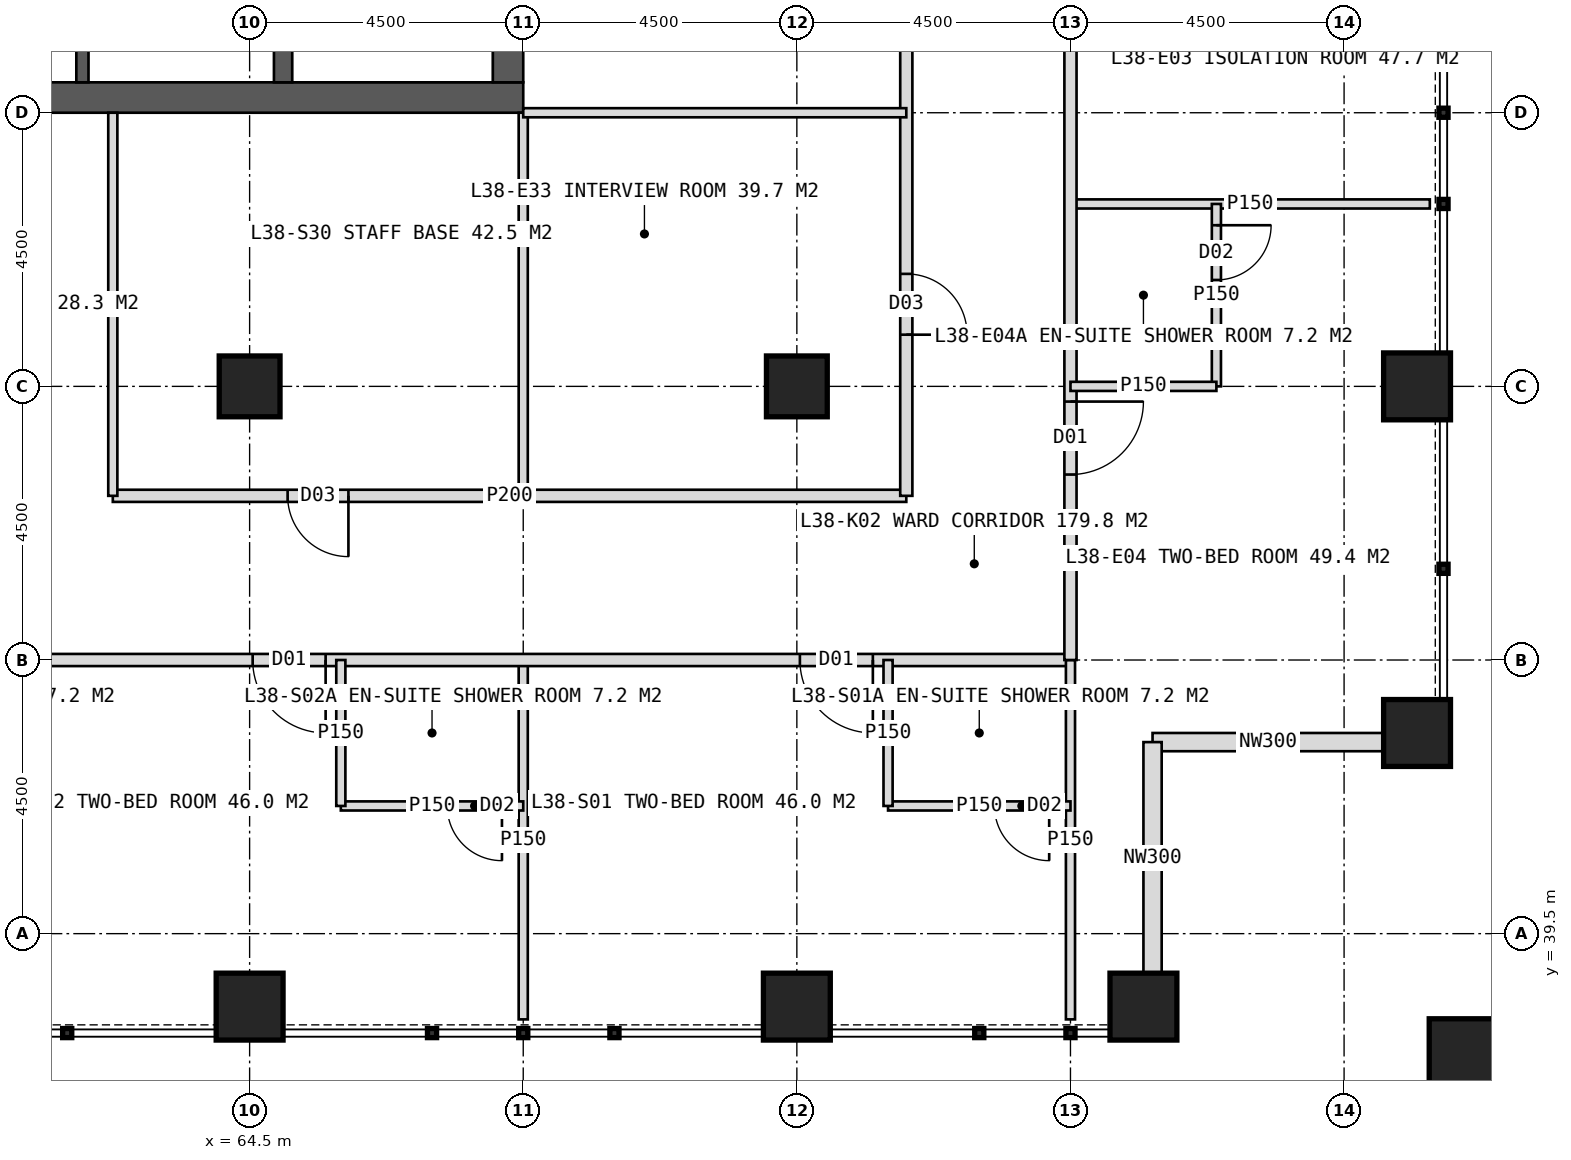
"""IFC4 building model, lengths in metres.
Left out: names, types, materials, properties, quantities, classifications, styles, units other than length and angle.
Written with IfcOpenShell. Run it as: python <this file> out.ifc"""

import sys

from ifc_helpers import new_model, si_unit, direction, frame, frame_2d, origin, origin_2d, place, context, subcontext, project, spatial, rectangle, hollow_rectangle, extrude, element, fill, save


model = new_model("IFC4")
c1 = context("Model", 3, precision=1e-05, world=origin(), true_north=direction((0.0, 1.0)))
c2 = subcontext(c1, "Body", "Model", "MODEL_VIEW")
j1 = project(units=[si_unit("LENGTHUNIT", "METRE"), si_unit("PLANEANGLEUNIT", "RADIAN")], contexts=[c1])
p1 = place(None, origin())
s1 = spatial("IfcSite", under=j1, at=p1, CompositionType="ELEMENT")
p2 = place(p1, origin())
s2 = spatial("IfcBuilding", under=s1, at=p2, CompositionType="ELEMENT")
p3 = place(p2, frame((0.0, 0.0, 160.0)))
s3 = spatial("IfcBuildingStorey", under=s2, at=p3, CompositionType="ELEMENT", Elevation=160.0)
p4 = place(p3, frame((51.0, 53.25, 0.0), z_axis=(0.0, 0.0, 1.0), x_axis=(1.0, 0.0, 0.0)))
e1 = element("IfcWall", 1, at=p4, inside=s3, PredefinedType="SHEAR", context=c2, shape_type="SweptSolid", body=[
    extrude(rectangle(XDim=18.0, YDim=0.5, at=frame_2d((9.0, 0.0))), origin(), (0.0, 0.0, 1.0), 4.0),
])
p5 = place(p4, frame((8.1, 0.0, 0.0)))
e2 = element("IfcOpeningElement", 2, at=p5, cuts=e1, PredefinedType="OPENING", context=c2, shape_type="SweptSolid", body=[
    extrude(rectangle(XDim=1.8, YDim=2.2, at=frame_2d((0.9, 1.1))), frame((0.0, 0.26, 0.0), z_axis=(0.0, -1.0, 0.0), x_axis=(1.0, 0.0, 0.0)), (0.0, 0.0, 1.0), 0.52),
])
p6 = place(p3, frame((68.75, 53.5, 0.0), z_axis=(0.0, 0.0, 1.0), x_axis=(0.0, 1.0, 0.0)))
e3 = element("IfcWall", 3, at=p6, inside=s3, PredefinedType="SHEAR", context=c2, shape_type="SweptSolid", body=[
    extrude(rectangle(XDim=17.0, YDim=0.5, at=frame_2d((8.5, 0.0))), origin(), (0.0, 0.0, 1.0), 4.0),
])
p7 = place(p6, frame((9.5, 0.0, 0.0)))
e4 = element("IfcOpeningElement", 4, at=p7, cuts=e3, PredefinedType="OPENING", context=c2, shape_type="SweptSolid", body=[
    extrude(rectangle(XDim=1.5, YDim=2.2, at=frame_2d((0.75, 1.1))), frame((0.0, 0.26, 0.0), z_axis=(0.0, -1.0, 0.0), x_axis=(1.0, 0.0, 0.0)), (0.0, 0.0, 1.0), 0.52),
])
p8 = place(p3, frame((65.05, 53.5, 0.0), z_axis=(0.0, 0.0, 1.0), x_axis=(0.0, 1.0, 0.0)))
e5 = element("IfcWall", 5, at=p8, inside=s3, PredefinedType="SHEAR", context=c2, shape_type="SweptSolid", body=[
    extrude(rectangle(XDim=17.0, YDim=0.3, at=frame_2d((8.5, 0.0))), origin(), (0.0, 0.0, 1.0), 4.0),
])
p9 = place(p3, frame((61.75, 53.5, 0.0), z_axis=(0.0, 0.0, 1.0), x_axis=(0.0, 1.0, 0.0)))
e6 = element("IfcWall", 6, at=p9, inside=s3, PredefinedType="SHEAR", context=c2, shape_type="SweptSolid", body=[
    extrude(rectangle(XDim=17.0, YDim=0.2, at=frame_2d((8.5, 0.0))), origin(), (0.0, 0.0, 1.0), 4.0),
])
p10 = place(p9, frame((1.375, 0.0, 0.0)))
e7 = element("IfcOpeningElement", 7, at=p10, cuts=e6, PredefinedType="OPENING", context=c2, shape_type="SweptSolid", body=[
    extrude(rectangle(XDim=1.4, YDim=2.2, at=frame_2d((0.7, 1.1))), frame((0.0, 0.11, 0.0), z_axis=(0.0, -1.0, 0.0), x_axis=(1.0, 0.0, 0.0)), (0.0, 0.0, 1.0), 0.22),
])
p11 = place(p9, frame((5.675, 0.0, 0.0)))
e8 = element("IfcOpeningElement", 8, at=p11, cuts=e6, PredefinedType="OPENING", context=c2, shape_type="SweptSolid", body=[
    extrude(rectangle(XDim=1.4, YDim=2.2, at=frame_2d((0.7, 1.1))), frame((0.0, 0.11, 0.0), z_axis=(0.0, -1.0, 0.0), x_axis=(1.0, 0.0, 0.0)), (0.0, 0.0, 1.0), 0.22),
])
for number, where, z_axis, x_axis in (
    (9, (73.5, 48.5, 0.0), (0.0, 0.0, 1.0), (1.0, 0.0, 0.0)),
    (10, (64.5, 48.5, 0.0), (0.0, 0.0, 1.0), (1.0, 0.0, 0.0)),
):
    element("IfcColumn", number, at=place(p3, frame(where, z_axis=z_axis, x_axis=x_axis)), inside=s3, PredefinedType="COLUMN", context=c2, shape_type="SweptSolid", body=[
        extrude(hollow_rectangle(XDim=1.0, YDim=1.0, WallThickness=0.1, at=origin_2d()), origin(), (0.0, 0.0, 1.0), 4.0),
    ])
for number, where, z_axis, x_axis in (
    (11, (83.7, 42.8, 0.0), (0.0, 0.0, 1.0), (1.0, 0.0, 0.0)),
    (12, (83.7, 48.5, 0.0), (0.0, 0.0, 1.0), (1.0, 0.0, 0.0)),
    (13, (64.5, 38.3, 0.0), (0.0, 0.0, 1.0), (1.0, 0.0, 0.0)),
    (14, (73.5, 38.3, 0.0), (0.0, 0.0, 1.0), (1.0, 0.0, 0.0)),
    (15, (79.2, 38.3, 0.0), (0.0, 0.0, 1.0), (1.0, 0.0, 0.0)),
):
    element("IfcColumn", number, at=place(p3, frame(where, z_axis=z_axis, x_axis=x_axis)), inside=s3, PredefinedType="COLUMN", context=c2, shape_type="SweptSolid", body=[
        extrude(hollow_rectangle(XDim=1.1, YDim=1.1, WallThickness=0.1, at=origin_2d()), origin(), (0.0, 0.0, 1.0), 4.0),
    ])
p12 = place(p3, frame((84.6, 37.4, 0.0), z_axis=(0.0, 0.0, 1.0), x_axis=(1.0, 0.0, 0.0)))
e16 = element("IfcColumn", 16, at=p12, inside=s3, PredefinedType="COLUMN", context=c2, shape_type="SweptSolid", body=[
    extrude(hollow_rectangle(XDim=1.4, YDim=1.4, WallThickness=0.08, at=origin_2d()), origin(), (0.0, 0.0, 1.0), 4.0),
])
for number, where, z_axis, x_axis in (
    (17, (83.15, 42.65, 0.0), (0.0, 0.0, 1.0), (-1.0, 0.0, 0.0)),
    (18, (79.35, 42.65, 0.0), (0.0, 0.0, 1.0), (0.0, -1.0, 0.0)),
):
    element("IfcWall", number, at=place(p3, frame(where, z_axis=z_axis, x_axis=x_axis)), inside=s3, PredefinedType="ELEMENTEDWALL", context=c2, shape_type="SweptSolid", body=[
        extrude(rectangle(XDim=3.8, YDim=0.3, at=frame_2d((1.9, 0.0))), origin(), (0.0, 0.0, 1.0), 4.0),
    ])
p13 = place(p3, frame((69.0, 44.0, 0.0), z_axis=(0.0, 0.0, 1.0), x_axis=(0.0, -1.0, 0.0)))
e19 = element("IfcWall", 19, at=p13, inside=s3, PredefinedType="PARTITIONING", context=c2, shape_type="SweptSolid", body=[
    extrude(rectangle(XDim=5.91, YDim=0.15, at=frame_2d((2.955, 0.0))), origin(), (0.0, 0.0, 1.0), 3.75),
])
p14 = place(p3, frame((78.0, 44.0, 0.0), z_axis=(0.0, 0.0, 1.0), x_axis=(-1.0, 0.0, 0.0)))
e20 = element("IfcWall", 20, at=p14, inside=s3, PredefinedType="PARTITIONING", context=c2, shape_type="SweptSolid", body=[
    extrude(rectangle(XDim=36.0, YDim=0.2, at=frame_2d((18.0, 0.0))), origin(), (0.0, 0.0, 1.0), 3.75),
])
p15 = place(p14, frame((3.25, 0.0, 0.0)))
e21 = element("IfcOpeningElement", 21, at=p15, cuts=e20, PredefinedType="OPENING", context=c2, shape_type="SweptSolid", body=[
    extrude(rectangle(XDim=1.2, YDim=2.2, at=frame_2d((0.6, 1.1))), frame((0.0, 0.11, 0.0), z_axis=(0.0, -1.0, 0.0), x_axis=(1.0, 0.0, 0.0)), (0.0, 0.0, 1.0), 0.22),
])
p16 = place(p14, frame((12.25, 0.0, 0.0)))
e22 = element("IfcOpeningElement", 22, at=p16, cuts=e20, PredefinedType="OPENING", context=c2, shape_type="SweptSolid", body=[
    extrude(rectangle(XDim=1.2, YDim=2.2, at=frame_2d((0.6, 1.1))), frame((0.0, 0.11, 0.0), z_axis=(0.0, -1.0, 0.0), x_axis=(1.0, 0.0, 0.0)), (0.0, 0.0, 1.0), 0.22),
])
p17 = place(p14, frame((21.25, 0.0, 0.0)))
e23 = element("IfcOpeningElement", 23, at=p17, cuts=e20, PredefinedType="OPENING", context=c2, shape_type="SweptSolid", body=[
    extrude(rectangle(XDim=1.2, YDim=2.2, at=frame_2d((0.6, 1.1))), frame((0.0, 0.11, 0.0), z_axis=(0.0, -1.0, 0.0), x_axis=(1.0, 0.0, 0.0)), (0.0, 0.0, 1.0), 0.22),
])
p18 = place(p14, frame((29.65, 0.0, 0.0)))
e24 = element("IfcOpeningElement", 24, at=p18, cuts=e20, PredefinedType="OPENING", context=c2, shape_type="SweptSolid", body=[
    extrude(rectangle(XDim=1.2, YDim=2.2, at=frame_2d((0.6, 1.1))), frame((0.0, 0.11, 0.0), z_axis=(0.0, -1.0, 0.0), x_axis=(1.0, 0.0, 0.0)), (0.0, 0.0, 1.0), 0.22),
])
p19 = place(p3, frame((78.0, 44.0, 0.0), z_axis=(0.0, 0.0, 1.0), x_axis=(0.0, -1.0, 0.0)))
e25 = element("IfcWall", 25, at=p19, inside=s3, PredefinedType="PARTITIONING", context=c2, shape_type="SweptSolid", body=[
    extrude(rectangle(XDim=5.91, YDim=0.15, at=frame_2d((2.955, 0.0))), origin(), (0.0, 0.0, 1.0), 3.75),
])
p20 = place(p3, frame((78.0, 41.6, 0.0), z_axis=(0.0, 0.0, 1.0), x_axis=(-1.0, 0.0, 0.0)))
e26 = element("IfcWall", 26, at=p20, inside=s3, PredefinedType="PARTITIONING", context=c2, shape_type="SweptSolid", body=[
    extrude(rectangle(XDim=3.0, YDim=0.15, at=frame_2d((1.5, 0.0))), origin(), (0.0, 0.0, 1.0), 3.75),
])
p21 = place(p20, frame((0.35, 0.0, 0.0)))
e27 = element("IfcOpeningElement", 27, at=p21, cuts=e26, PredefinedType="OPENING", context=c2, shape_type="SweptSolid", body=[
    extrude(rectangle(XDim=0.9, YDim=2.1, at=frame_2d((0.45, 1.05))), frame((0.0, 0.085, 0.0), z_axis=(0.0, -1.0, 0.0), x_axis=(1.0, 0.0, 0.0)), (0.0, 0.0, 1.0), 0.17),
])
p22 = place(p3, frame((75.0, 44.0, 0.0), z_axis=(0.0, 0.0, 1.0), x_axis=(0.0, -1.0, 0.0)))
e28 = element("IfcWall", 28, at=p22, inside=s3, PredefinedType="PARTITIONING", context=c2, shape_type="SweptSolid", body=[
    extrude(rectangle(XDim=2.4, YDim=0.15, at=frame_2d((1.2, 0.0))), origin(), (0.0, 0.0, 1.0), 3.75),
])
p23 = place(p3, frame((69.0, 41.6, 0.0), z_axis=(0.0, 0.0, 1.0), x_axis=(-1.0, 0.0, 0.0)))
e29 = element("IfcWall", 29, at=p23, inside=s3, PredefinedType="PARTITIONING", context=c2, shape_type="SweptSolid", body=[
    extrude(rectangle(XDim=3.0, YDim=0.15, at=frame_2d((1.5, 0.0))), origin(), (0.0, 0.0, 1.0), 3.75),
])
p24 = place(p23, frame((0.35, 0.0, 0.0)))
e30 = element("IfcOpeningElement", 30, at=p24, cuts=e29, PredefinedType="OPENING", context=c2, shape_type="SweptSolid", body=[
    extrude(rectangle(XDim=0.9, YDim=2.1, at=frame_2d((0.45, 1.05))), frame((0.0, 0.085, 0.0), z_axis=(0.0, -1.0, 0.0), x_axis=(1.0, 0.0, 0.0)), (0.0, 0.0, 1.0), 0.17),
])
p25 = place(p3, frame((66.0, 44.0, 0.0), z_axis=(0.0, 0.0, 1.0), x_axis=(0.0, -1.0, 0.0)))
e31 = element("IfcWall", 31, at=p25, inside=s3, PredefinedType="PARTITIONING", context=c2, shape_type="SweptSolid", body=[
    extrude(rectangle(XDim=2.4, YDim=0.15, at=frame_2d((1.2, 0.0))), origin(), (0.0, 0.0, 1.0), 3.75),
])
p26 = place(p3, frame((69.0, 53.0, 0.0), z_axis=(0.0, 0.0, 1.0), x_axis=(0.0, -1.0, 0.0)))
e32 = element("IfcWall", 32, at=p26, inside=s3, PredefinedType="PARTITIONING", context=c2, shape_type="SweptSolid", body=[
    extrude(rectangle(XDim=6.3, YDim=0.15, at=frame_2d((3.15, 0.0))), origin(), (0.0, 0.0, 1.0), 3.75),
])
p27 = place(p3, frame((75.3, 46.7, 0.0), z_axis=(0.0, 0.0, 1.0), x_axis=(-1.0, 0.0, 0.0)))
e33 = element("IfcWall", 33, at=p27, inside=s3, PredefinedType="PARTITIONING", context=c2, shape_type="SweptSolid", body=[
    extrude(rectangle(XDim=13.05, YDim=0.2, at=frame_2d((6.525, 0.0))), origin(), (0.0, 0.0, 1.0), 3.75),
])
p28 = place(p27, frame((9.175, 0.0, 0.0)))
e34 = element("IfcOpeningElement", 34, at=p28, cuts=e33, PredefinedType="OPENING", context=c2, shape_type="SweptSolid", body=[
    extrude(rectangle(XDim=1.0, YDim=2.1, at=frame_2d((0.5, 1.05))), frame((0.0, 0.11, 0.0), z_axis=(0.0, -1.0, 0.0), x_axis=(1.0, 0.0, 0.0)), (0.0, 0.0, 1.0), 0.22),
])
p29 = place(p3, frame((62.25, 53.0, 0.0), z_axis=(0.0, 0.0, 1.0), x_axis=(0.0, -1.0, 0.0)))
e35 = element("IfcWall", 35, at=p29, inside=s3, PredefinedType="PARTITIONING", context=c2, shape_type="SweptSolid", body=[
    extrude(rectangle(XDim=6.3, YDim=0.15, at=frame_2d((3.15, 0.0))), origin(), (0.0, 0.0, 1.0), 3.75),
])
p30 = place(p3, frame((78.0, 51.5, 0.0), z_axis=(0.0, 0.0, 1.0), x_axis=(1.0, 0.0, 0.0)))
e36 = element("IfcWall", 36, at=p30, inside=s3, PredefinedType="PARTITIONING", context=c2, shape_type="SweptSolid", body=[
    extrude(rectangle(XDim=5.91, YDim=0.15, at=frame_2d((2.955, 0.0))), origin(), (0.0, 0.0, 1.0), 3.75),
])
p31 = place(p3, frame((78.0, 80.0, 0.0), z_axis=(0.0, 0.0, 1.0), x_axis=(0.0, -1.0, 0.0)))
e37 = element("IfcWall", 37, at=p31, inside=s3, PredefinedType="PARTITIONING", context=c2, shape_type="SweptSolid", body=[
    extrude(rectangle(XDim=36.0, YDim=0.2, at=frame_2d((18.0, 0.0))), origin(), (0.0, 0.0, 1.0), 3.75),
])
p32 = place(p31, frame((3.25, 0.0, 0.0)))
e38 = element("IfcOpeningElement", 38, at=p32, cuts=e37, PredefinedType="OPENING", context=c2, shape_type="SweptSolid", body=[
    extrude(rectangle(XDim=1.2, YDim=2.2, at=frame_2d((0.6, 1.1))), frame((0.0, 0.11, 0.0), z_axis=(0.0, -1.0, 0.0), x_axis=(1.0, 0.0, 0.0)), (0.0, 0.0, 1.0), 0.22),
])
p33 = place(p31, frame((10.75, 0.0, 0.0)))
e39 = element("IfcOpeningElement", 39, at=p33, cuts=e37, PredefinedType="OPENING", context=c2, shape_type="SweptSolid", body=[
    extrude(rectangle(XDim=1.2, YDim=2.2, at=frame_2d((0.6, 1.1))), frame((0.0, 0.11, 0.0), z_axis=(0.0, -1.0, 0.0), x_axis=(1.0, 0.0, 0.0)), (0.0, 0.0, 1.0), 0.22),
])
p34 = place(p31, frame((21.25, 0.0, 0.0)))
e40 = element("IfcOpeningElement", 40, at=p34, cuts=e37, PredefinedType="OPENING", context=c2, shape_type="SweptSolid", body=[
    extrude(rectangle(XDim=1.2, YDim=2.2, at=frame_2d((0.6, 1.1))), frame((0.0, 0.11, 0.0), z_axis=(0.0, -1.0, 0.0), x_axis=(1.0, 0.0, 0.0)), (0.0, 0.0, 1.0), 0.22),
])
p35 = place(p31, frame((31.75, 0.0, 0.0)))
e41 = element("IfcOpeningElement", 41, at=p35, cuts=e37, PredefinedType="OPENING", context=c2, shape_type="SweptSolid", body=[
    extrude(rectangle(XDim=1.2, YDim=2.2, at=frame_2d((0.6, 1.1))), frame((0.0, 0.11, 0.0), z_axis=(0.0, -1.0, 0.0), x_axis=(1.0, 0.0, 0.0)), (0.0, 0.0, 1.0), 0.22),
])
p36 = place(p3, frame((80.4, 51.5, 0.0), z_axis=(0.0, 0.0, 1.0), x_axis=(0.0, -1.0, 0.0)))
e42 = element("IfcWall", 42, at=p36, inside=s3, PredefinedType="PARTITIONING", context=c2, shape_type="SweptSolid", body=[
    extrude(rectangle(XDim=3.0, YDim=0.15, at=frame_2d((1.5, 0.0))), origin(), (0.0, 0.0, 1.0), 3.75),
])
p37 = place(p36, frame((0.35, 0.0, 0.0)))
e43 = element("IfcOpeningElement", 43, at=p37, cuts=e42, PredefinedType="OPENING", context=c2, shape_type="SweptSolid", body=[
    extrude(rectangle(XDim=0.9, YDim=2.1, at=frame_2d((0.45, 1.05))), frame((0.0, 0.085, 0.0), z_axis=(0.0, -1.0, 0.0), x_axis=(1.0, 0.0, 0.0)), (0.0, 0.0, 1.0), 0.17),
])
p38 = place(p3, frame((78.0, 48.5, 0.0), z_axis=(0.0, 0.0, 1.0), x_axis=(1.0, 0.0, 0.0)))
e44 = element("IfcWall", 44, at=p38, inside=s3, PredefinedType="PARTITIONING", context=c2, shape_type="SweptSolid", body=[
    extrude(rectangle(XDim=2.4, YDim=0.15, at=frame_2d((1.2, 0.0))), origin(), (0.0, 0.0, 1.0), 2.95),
])
p39 = place(p3, frame((75.3, 62.0, 0.0), z_axis=(0.0, 0.0, 1.0), x_axis=(0.0, -1.0, 0.0)))
e45 = element("IfcWall", 45, at=p39, inside=s3, PredefinedType="PARTITIONING", context=c2, shape_type="SweptSolid", body=[
    extrude(rectangle(XDim=15.3, YDim=0.2, at=frame_2d((7.65, 0.0))), origin(), (0.0, 0.0, 1.0), 3.75),
])
p40 = place(p39, frame((4.0, 0.0, 0.0)))
e46 = element("IfcOpeningElement", 46, at=p40, cuts=e45, PredefinedType="OPENING", context=c2, shape_type="SweptSolid", body=[
    extrude(rectangle(XDim=1.0, YDim=2.1, at=frame_2d((0.5, 1.05))), frame((0.0, 0.11, 0.0), z_axis=(0.0, -1.0, 0.0), x_axis=(1.0, 0.0, 0.0)), (0.0, 0.0, 1.0), 0.22),
])
p41 = place(p39, frame((11.65, 0.0, 0.0)))
e47 = element("IfcOpeningElement", 47, at=p41, cuts=e45, PredefinedType="OPENING", context=c2, shape_type="SweptSolid", body=[
    extrude(rectangle(XDim=1.0, YDim=2.1, at=frame_2d((0.5, 1.05))), frame((0.0, 0.11, 0.0), z_axis=(0.0, -1.0, 0.0), x_axis=(1.0, 0.0, 0.0)), (0.0, 0.0, 1.0), 0.22),
])
p42 = place(p3, frame((69.0, 53.0, 0.0), z_axis=(0.0, 0.0, 1.0), x_axis=(1.0, 0.0, 0.0)))
e48 = element("IfcWall", 48, at=p42, inside=s3, PredefinedType="PARTITIONING", context=c2, shape_type="SweptSolid", body=[
    extrude(rectangle(XDim=6.3, YDim=0.15, at=frame_2d((3.15, 0.0))), origin(), (0.0, 0.0, 1.0), 3.75),
])
p43 = place(p15, origin())
e49 = element("IfcDoor", 49, at=p43, inside=s3, OperationType="SINGLE_SWING_LEFT", PredefinedType="DOOR", context=c2, shape_type="SweptSolid", body=[
    extrude(rectangle(XDim=1.2, YDim=2.2, at=frame_2d((0.6, 1.1))), frame((0.0, 0.025, 0.0), z_axis=(0.0, -1.0, 0.0), x_axis=(1.0, 0.0, 0.0)), (0.0, 0.0, 1.0), 0.05),
])
fill(e21, e49)
p44 = place(p21, origin())
e50 = element("IfcDoor", 50, at=p44, inside=s3, OperationType="SINGLE_SWING_LEFT", PredefinedType="DOOR", context=c2, shape_type="SweptSolid", body=[
    extrude(rectangle(XDim=0.9, YDim=2.1, at=frame_2d((0.45, 1.05))), frame((0.0, 0.025, 0.0), z_axis=(0.0, -1.0, 0.0), x_axis=(1.0, 0.0, 0.0)), (0.0, 0.0, 1.0), 0.05),
])
fill(e27, e50)
p45 = place(p16, origin())
e51 = element("IfcDoor", 51, at=p45, inside=s3, OperationType="SINGLE_SWING_LEFT", PredefinedType="DOOR", context=c2, shape_type="SweptSolid", body=[
    extrude(rectangle(XDim=1.2, YDim=2.2, at=frame_2d((0.6, 1.1))), frame((0.0, 0.025, 0.0), z_axis=(0.0, -1.0, 0.0), x_axis=(1.0, 0.0, 0.0)), (0.0, 0.0, 1.0), 0.05),
])
fill(e22, e51)
p46 = place(p24, origin())
e52 = element("IfcDoor", 52, at=p46, inside=s3, OperationType="SINGLE_SWING_LEFT", PredefinedType="DOOR", context=c2, shape_type="SweptSolid", body=[
    extrude(rectangle(XDim=0.9, YDim=2.1, at=frame_2d((0.45, 1.05))), frame((0.0, 0.025, 0.0), z_axis=(0.0, -1.0, 0.0), x_axis=(1.0, 0.0, 0.0)), (0.0, 0.0, 1.0), 0.05),
])
fill(e30, e52)
p47 = place(p28, origin())
e53 = element("IfcDoor", 53, at=p47, inside=s3, OperationType="SINGLE_SWING_LEFT", PredefinedType="DOOR", context=c2, shape_type="SweptSolid", body=[
    extrude(rectangle(XDim=1.0, YDim=2.1, at=frame_2d((0.5, 1.05))), frame((0.0, 0.025, 0.0), z_axis=(0.0, -1.0, 0.0), x_axis=(1.0, 0.0, 0.0)), (0.0, 0.0, 1.0), 0.05),
])
fill(e34, e53)
p48 = place(p35, origin())
e54 = element("IfcDoor", 54, at=p48, inside=s3, OperationType="SINGLE_SWING_LEFT", PredefinedType="DOOR", context=c2, shape_type="SweptSolid", body=[
    extrude(rectangle(XDim=1.2, YDim=2.2, at=frame_2d((0.6, 1.1))), frame((0.0, 0.025, 0.0), z_axis=(0.0, -1.0, 0.0), x_axis=(1.0, 0.0, 0.0)), (0.0, 0.0, 1.0), 0.05),
])
fill(e41, e54)
p49 = place(p37, origin())
e55 = element("IfcDoor", 55, at=p49, inside=s3, OperationType="SINGLE_SWING_LEFT", PredefinedType="DOOR", context=c2, shape_type="SweptSolid", body=[
    extrude(rectangle(XDim=0.9, YDim=2.1, at=frame_2d((0.45, 1.05))), frame((0.0, 0.025, 0.0), z_axis=(0.0, -1.0, 0.0), x_axis=(1.0, 0.0, 0.0)), (0.0, 0.0, 1.0), 0.05),
])
fill(e43, e55)
p50 = place(p41, origin())
e56 = element("IfcDoor", 56, at=p50, inside=s3, OperationType="SINGLE_SWING_RIGHT", PredefinedType="DOOR", context=c2, shape_type="SweptSolid", body=[
    extrude(rectangle(XDim=1.0, YDim=2.1, at=frame_2d((0.5, 1.05))), frame((0.0, 0.025, 0.0), z_axis=(0.0, -1.0, 0.0), x_axis=(1.0, 0.0, 0.0)), (0.0, 0.0, 1.0), 0.05),
])
fill(e47, e56)
save(model, sys.argv[1])
